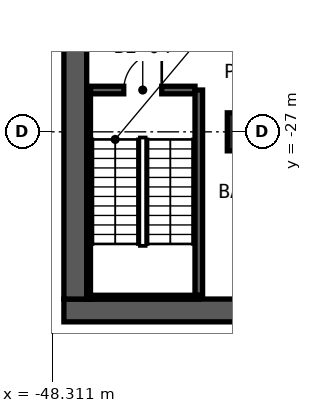
"""IFC4 building model, lengths in metres.
Left out: names, types, materials, properties, quantities, classifications, styles, units other than length and angle.
Written with IfcOpenShell. Run it as: python <this file> out.ifc"""

import sys

from ifc_helpers import new_model, si_unit, direction, frame, frame_2d, origin, origin_2d, place, context, subcontext, project, spatial, rectangle, extrude, element, fill, save


model = new_model("IFC4")
c1 = context("Model", 3, precision=1e-05, world=origin(), true_north=direction((0.0, 1.0)))
c2 = subcontext(c1, "Body", "Model", "MODEL_VIEW")
j1 = project(units=[si_unit("LENGTHUNIT", "METRE"), si_unit("PLANEANGLEUNIT", "RADIAN")], contexts=[c1])
p1 = place(None, origin())
s1 = spatial("IfcSite", under=j1, at=p1, CompositionType="ELEMENT")
p2 = place(p1, origin())
s2 = spatial("IfcBuilding", under=s1, at=p2, CompositionType="ELEMENT")
p3 = place(p2, frame((0.0, 0.0, -8.4)))
s3 = spatial("IfcBuildingStorey", under=s2, at=p3, CompositionType="ELEMENT", Elevation=-8.4)
p4 = place(p3, frame((-48.0, -31.7, -0.35), z_axis=(0.0, 0.0, 1.0), x_axis=(1.0, 0.0, 0.0)))
e1 = element("IfcWall", 1, at=p4, inside=s3, PredefinedType="SOLIDWALL", context=c2, shape_type="SweptSolid", body=[
    extrude(rectangle(XDim=96.0, YDim=0.6, at=frame_2d((48.0, 0.0))), origin(), (0.0, 0.0, 1.0), 4.55),
])
p5 = place(p3, frame((-47.7, -31.4, -0.35), z_axis=(0.0, 0.0, 1.0), x_axis=(0.0, 1.0, 0.0)))
e2 = element("IfcWall", 2, at=p5, inside=s3, PredefinedType="SOLIDWALL", context=c2, shape_type="SweptSolid", body=[
    extrude(rectangle(XDim=70.8, YDim=0.6, at=frame_2d((35.4, 0.0))), origin(), (0.0, 0.0, 1.0), 4.55),
])
p6 = place(p3, frame((-43.2, -27.0, -0.35), z_axis=(0.0, 0.0, 1.0), x_axis=(1.0, 0.0, 0.0)))
e3 = element("IfcColumn", 3, at=p6, inside=s3, PredefinedType="COLUMN", context=c2, shape_type="SweptSolid", body=[
    extrude(rectangle(XDim=1.0, YDim=1.0, at=origin_2d()), origin(), (0.0, 0.0, 1.0), 4.55),
])
p7 = place(p3, frame((-47.3, -25.9, 0.0), z_axis=(0.0, 0.0, 1.0), x_axis=(1.0, 0.0, 0.0)))
e4 = element("IfcWall", 4, at=p7, inside=s3, PredefinedType="SOLIDWALL", context=c2, shape_type="SweptSolid", body=[
    extrude(rectangle(XDim=2.75, YDim=0.2, at=frame_2d((1.375, 0.0))), origin(), (0.0, 0.0, 1.0), 3.85),
])
p8 = place(p7, frame((1.875, 0.0, 0.0), z_axis=(0.0, 0.0, 1.0), x_axis=(-1.0, 0.0, 0.0)))
e5 = element("IfcOpeningElement", 5, at=p8, cuts=e4, PredefinedType="OPENING", context=c2, shape_type="SweptSolid", body=[
    extrude(rectangle(XDim=1.0, YDim=2.1, at=frame_2d((0.5, 1.05))), frame((0.0, 0.11, 0.0), z_axis=(0.0, -1.0, 0.0), x_axis=(1.0, 0.0, 0.0)), (0.0, 0.0, 1.0), 0.22),
])
p9 = place(p3, frame((-44.45, -31.3, 0.0), z_axis=(0.0, 0.0, 1.0), x_axis=(0.0, 1.0, 0.0)))
e6 = element("IfcWall", 6, at=p9, inside=s3, PredefinedType="SOLIDWALL", context=c2, shape_type="SweptSolid", body=[
    extrude(rectangle(XDim=5.4, YDim=0.2, at=frame_2d((2.7, 0.0))), origin(), (0.0, 0.0, 1.0), 3.85),
])
p10 = place(p3, frame((-47.35, -31.4, 0.0), z_axis=(0.0, 0.0, 1.0), x_axis=(0.0, 1.0, 0.0)))
e7 = element("IfcWall", 7, at=p10, inside=s3, PredefinedType="SOLIDWALL", context=c2, shape_type="SweptSolid", body=[
    extrude(rectangle(XDim=5.5, YDim=0.1, at=frame_2d((2.75, 0.0))), origin(), (0.0, 0.0, 1.0), 3.85),
])
p11 = place(p3, frame((-47.4, -31.35, 0.0), z_axis=(0.0, 0.0, 1.0), x_axis=(1.0, 0.0, 0.0)))
e8 = element("IfcWall", 8, at=p11, inside=s3, PredefinedType="SOLIDWALL", context=c2, shape_type="SweptSolid", body=[
    extrude(rectangle(XDim=2.95, YDim=0.1, at=frame_2d((1.475, 0.0))), origin(), (0.0, 0.0, 1.0), 3.85),
])
p12 = place(p8, origin())
e9 = element("IfcDoor", 9, at=p12, inside=s3, OperationType="SINGLE_SWING_LEFT", PredefinedType="DOOR", context=c2, shape_type="SweptSolid", body=[
    extrude(rectangle(XDim=1.0, YDim=2.1, at=frame_2d((0.5, 1.05))), frame((0.0, 0.025, 0.0), z_axis=(0.0, -1.0, 0.0), x_axis=(1.0, 0.0, 0.0)), (0.0, 0.0, 1.0), 0.05),
])
fill(e5, e9)
save(model, sys.argv[1])
